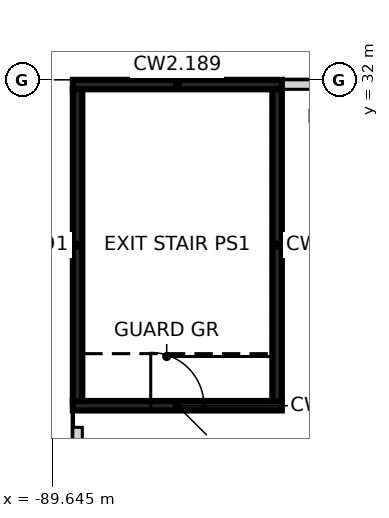
"""IFC4 building model, lengths in metres.
Left out: names, types, materials, properties, quantities, classifications, styles, units other than length and angle.
Written with IfcOpenShell. Run it as: python <this file> out.ifc"""

import sys

from ifc_helpers import new_model, si_unit, direction, frame, frame_2d, origin, place, context, subcontext, project, spatial, rectangle, extrude, element, fill, save


model = new_model("IFC4")
c1 = context("Model", 3, precision=1e-05, world=origin(), true_north=direction((0.0, 1.0)))
c2 = subcontext(c1, "Body", "Model", "MODEL_VIEW")
j1 = project(units=[si_unit("LENGTHUNIT", "METRE"), si_unit("PLANEANGLEUNIT", "RADIAN")], contexts=[c1])
p1 = place(None, origin())
s1 = spatial("IfcSite", under=j1, at=p1, CompositionType="ELEMENT")
p2 = place(p1, origin())
s2 = spatial("IfcBuilding", under=s1, at=p2, CompositionType="ELEMENT")
p3 = place(p2, frame((0.0, 0.0, 19.5)))
s3 = spatial("IfcBuildingStorey", under=s2, at=p3, CompositionType="ELEMENT", Elevation=19.5)
p4 = place(p3, frame((-83.6, 31.875, 0.0), z_axis=(0.0, 0.0, 1.0), x_axis=(1.0, 0.0, 0.0)))
e1 = element("IfcWall", 1, at=p4, inside=s3, PredefinedType="SOLIDWALL", context=c2, shape_type="SweptSolid", body=[
    extrude(rectangle(XDim=3.592, YDim=0.25, at=frame_2d((1.796, 0.0))), origin(), (0.0, 0.0, 1.0), 4.55),
])
p5 = place(p4, frame((0.896, 0.0, 1.1)))
e2 = element("IfcOpeningElement", 2, at=p5, cuts=e1, PredefinedType="OPENING", context=c2, shape_type="SweptSolid", body=[
    extrude(rectangle(XDim=1.8, YDim=1.5, at=frame_2d((0.9, 0.75))), frame((0.0, 0.135, 0.0), z_axis=(0.0, -1.0, 0.0), x_axis=(1.0, 0.0, 0.0)), (0.0, 0.0, 1.0), 0.27),
])
p6 = place(p3, frame((-88.975, 18.286, 0.0), z_axis=(0.0, 0.0, 1.0), x_axis=(0.0, 1.0, 0.0)))
e3 = element("IfcWall", 3, at=p6, inside=s3, PredefinedType="SOLIDWALL", context=c2, shape_type="SweptSolid", body=[
    extrude(rectangle(XDim=4.572, YDim=0.25, at=frame_2d((2.286, 0.0))), origin(), (0.0, 0.0, 1.0), 4.55),
])
p7 = place(p6, frame((1.386, 0.0, 1.1)))
e4 = element("IfcOpeningElement", 4, at=p7, cuts=e3, PredefinedType="OPENING", context=c2, shape_type="SweptSolid", body=[
    extrude(rectangle(XDim=1.8, YDim=1.5, at=frame_2d((0.9, 0.75))), frame((0.0, 0.135, 0.0), z_axis=(0.0, -1.0, 0.0), x_axis=(1.0, 0.0, 0.0)), (0.0, 0.0, 1.0), 0.27),
])
p8 = place(p3, frame((-89.1, 23.425, 0.0), z_axis=(0.0, 0.0, 1.0), x_axis=(1.0, 0.0, 0.0)))
e5 = element("IfcWall", 5, at=p8, inside=s3, PredefinedType="SHEAR", context=c2, shape_type="SweptSolid", body=[
    extrude(rectangle(XDim=5.5, YDim=0.25, at=frame_2d((2.75, 0.0))), origin(), (0.0, 0.0, 1.0), 4.55),
])
p9 = place(p8, frame((2.05, 0.0, 0.0)))
e6 = element("IfcOpeningElement", 6, at=p9, cuts=e5, PredefinedType="OPENING", context=c2, shape_type="SweptSolid", body=[
    extrude(rectangle(XDim=1.4, YDim=2.1, at=frame_2d((0.7, 1.05))), frame((0.0, 0.135, 0.0), z_axis=(0.0, -1.0, 0.0), x_axis=(1.0, 0.0, 0.0)), (0.0, 0.0, 1.0), 0.27),
])
p10 = place(p3, frame((-89.1, 31.875, 0.0), z_axis=(0.0, 0.0, 1.0), x_axis=(1.0, 0.0, 0.0)))
e7 = element("IfcWall", 7, at=p10, inside=s3, PredefinedType="SHEAR", context=c2, shape_type="SweptSolid", body=[
    extrude(rectangle(XDim=5.5, YDim=0.25, at=frame_2d((2.75, 0.0))), origin(), (0.0, 0.0, 1.0), 4.55),
])
for number, where, z_axis, x_axis in (
    (8, (-88.975, 23.55, 0.0), (0.0, 0.0, 1.0), (0.0, 1.0, 0.0)),
    (9, (-83.725, 23.55, 0.0), (0.0, 0.0, 1.0), (0.0, 1.0, 0.0)),
):
    element("IfcWall", number, at=place(p3, frame(where, z_axis=z_axis, x_axis=x_axis)), inside=s3, PredefinedType="SHEAR", context=c2, shape_type="SweptSolid", body=[
        extrude(rectangle(XDim=8.2, YDim=0.25, at=frame_2d((4.1, 0.0))), origin(), (0.0, 0.0, 1.0), 4.55),
    ])
p11 = place(p9, origin())
e10 = element("IfcDoor", 10, at=p11, inside=s3, OperationType="SINGLE_SWING_RIGHT", PredefinedType="DOOR", context=c2, shape_type="SweptSolid", body=[
    extrude(rectangle(XDim=1.4, YDim=2.1, at=frame_2d((0.7, 1.05))), frame((0.0, 0.025, 0.0), z_axis=(0.0, -1.0, 0.0), x_axis=(1.0, 0.0, 0.0)), (0.0, 0.0, 1.0), 0.05),
])
fill(e6, e10)
save(model, sys.argv[1])
